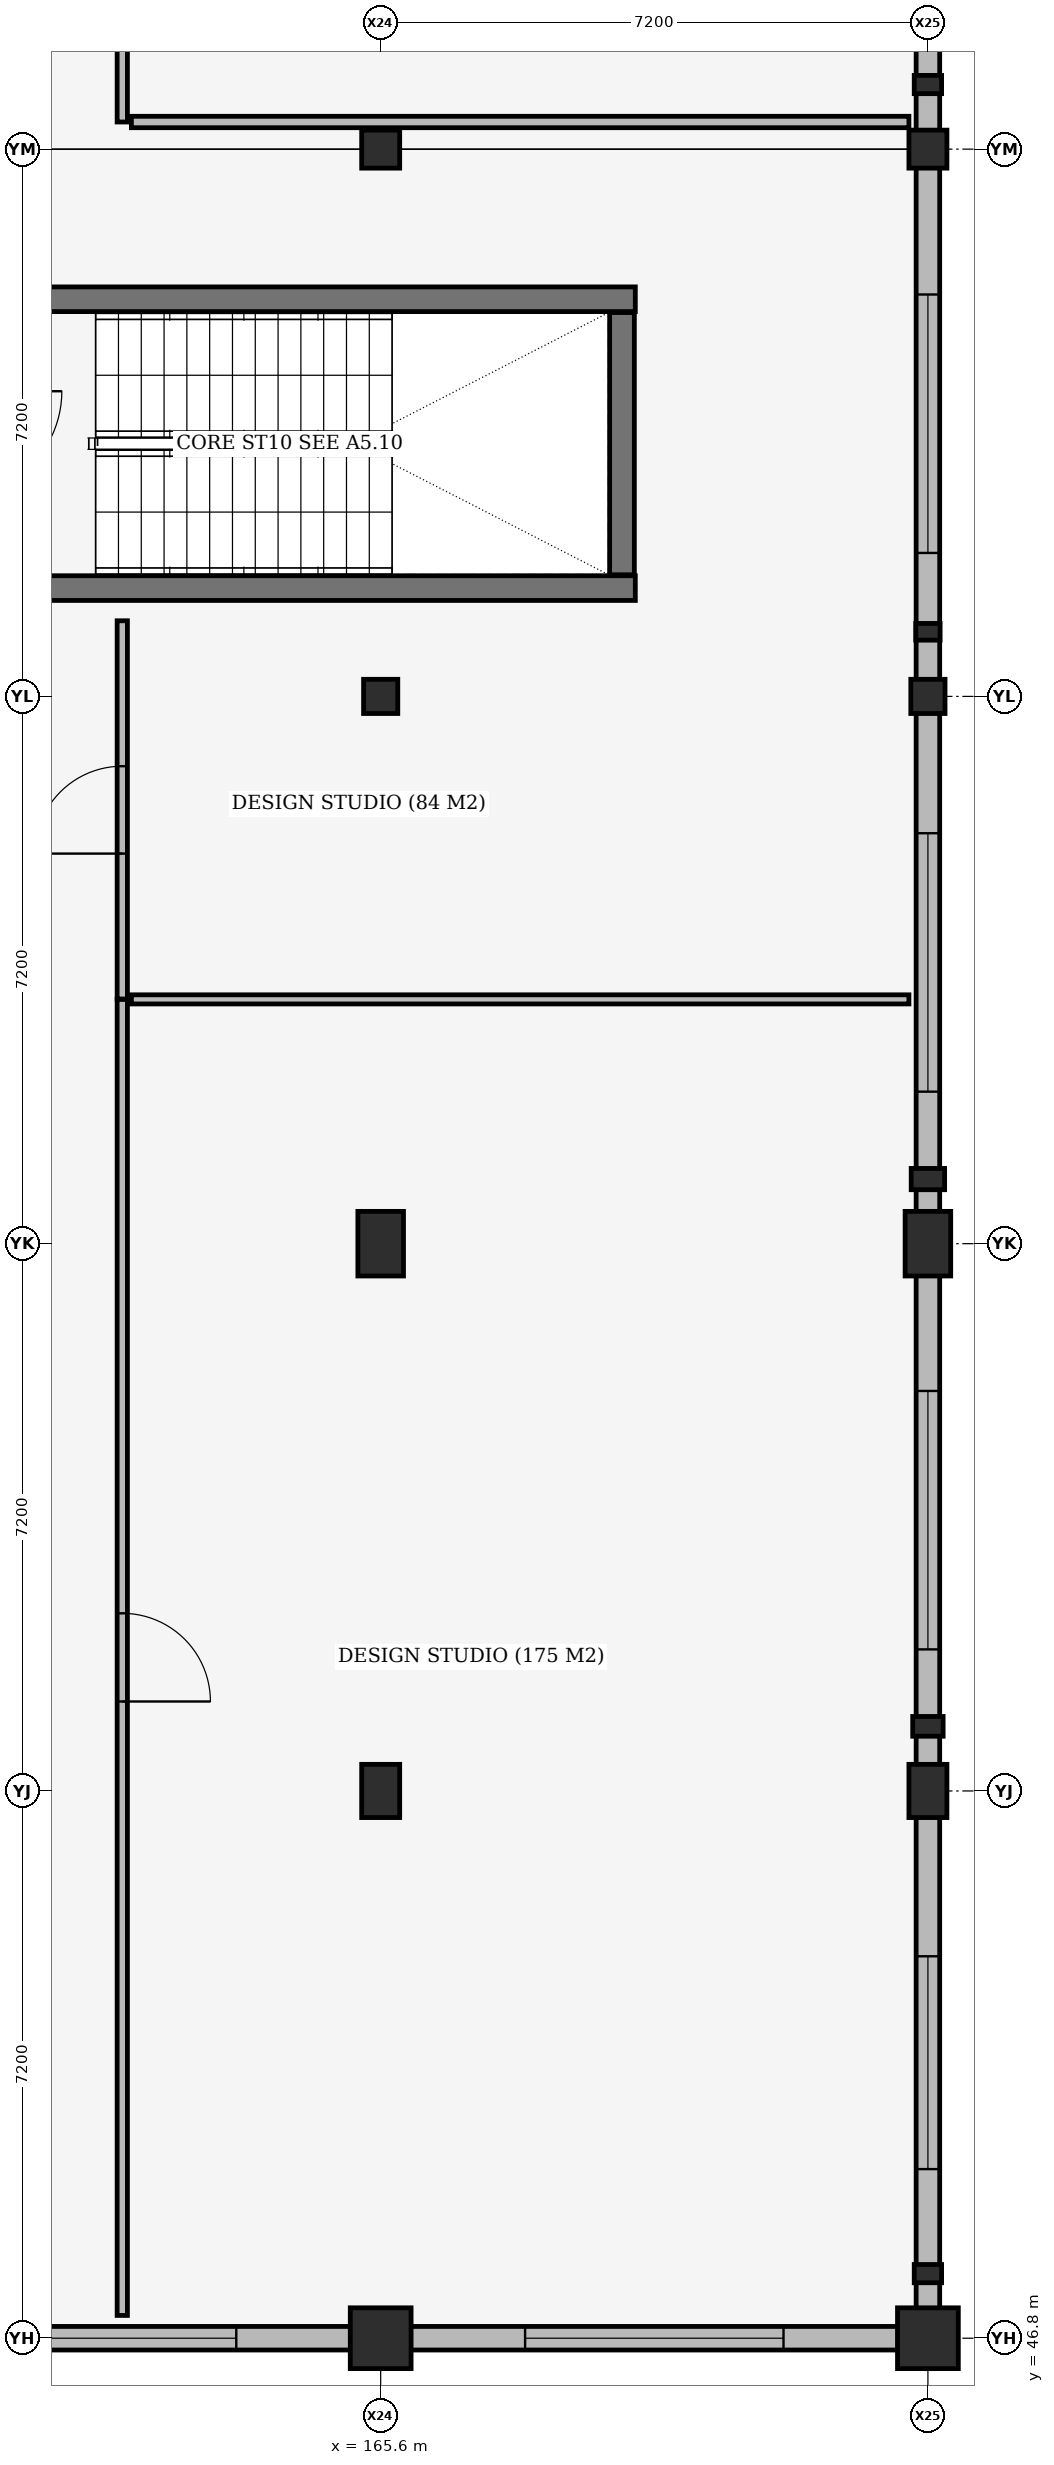
"""IFC4 building model, lengths in metres.
Left out: names, types, materials, properties, quantities, classifications, styles, units other than length and angle.
Written with IfcOpenShell. Run it as: python <this file> out.ifc"""

import sys

from ifc_helpers import new_model, si_unit, direction, frame, frame_2d, origin, origin_2d, place, context, subcontext, project, spatial, rectangle, extrude, element, fill, save


model = new_model("IFC4")
c1 = context("Model", 3, precision=1e-05, world=origin(), true_north=direction((0.0, 1.0)))
c2 = subcontext(c1, "Body", "Model", "MODEL_VIEW")
j1 = project(units=[si_unit("LENGTHUNIT", "METRE"), si_unit("PLANEANGLEUNIT", "RADIAN")], contexts=[c1])
p1 = place(None, origin())
s1 = spatial("IfcSite", under=j1, at=p1, CompositionType="ELEMENT")
p2 = place(p1, origin())
s2 = spatial("IfcBuilding", under=s1, at=p2, CompositionType="ELEMENT")
p3 = place(p2, frame((0.0, 0.0, 5.4)))
s3 = spatial("IfcBuildingStorey", under=s2, at=p3, CompositionType="ELEMENT", Elevation=5.4)
p4 = place(p3, frame((165.6, 46.8, 0.0), z_axis=(0.0, 0.0, 1.0), x_axis=(1.0, 0.0, 0.0)))
e1 = element("IfcColumn", 1, at=p4, inside=s3, PredefinedType="COLUMN", context=c2, shape_type="SweptSolid", body=[
    extrude(rectangle(XDim=0.8, YDim=0.8, at=origin_2d()), origin(), (0.0, 0.0, 1.0), 3.92),
])
p5 = place(p3, frame((165.6, 54.0, 0.0), z_axis=(0.0, 0.0, 1.0), x_axis=(1.0, 0.0, 0.0)))
e2 = element("IfcColumn", 2, at=p5, inside=s3, PredefinedType="COLUMN", context=c2, shape_type="SweptSolid", body=[
    extrude(rectangle(XDim=0.5, YDim=0.7, at=origin_2d()), origin(), (0.0, 0.0, 1.0), 3.92),
])
p6 = place(p3, frame((165.6, 61.2, 0.0), z_axis=(0.0, 0.0, 1.0), x_axis=(1.0, 0.0, 0.0)))
e3 = element("IfcColumn", 3, at=p6, inside=s3, PredefinedType="COLUMN", context=c2, shape_type="SweptSolid", body=[
    extrude(rectangle(XDim=0.6, YDim=0.85, at=origin_2d()), origin(), (0.0, 0.0, 1.0), 3.92),
])
p7 = place(p3, frame((165.6, 68.4, 0.0), z_axis=(0.0, 0.0, 1.0), x_axis=(1.0, 0.0, 0.0)))
e4 = element("IfcColumn", 4, at=p7, inside=s3, PredefinedType="COLUMN", context=c2, shape_type="SweptSolid", body=[
    extrude(rectangle(XDim=0.45, YDim=0.45, at=origin_2d()), origin(), (0.0, 0.0, 1.0), 3.92),
])
p8 = place(p3, frame((165.6, 75.6, 0.0), z_axis=(0.0, 0.0, 1.0), x_axis=(1.0, 0.0, 0.0)))
e5 = element("IfcColumn", 5, at=p8, inside=s3, PredefinedType="COLUMN", context=c2, shape_type="SweptSolid", body=[
    extrude(rectangle(XDim=0.5, YDim=0.5, at=origin_2d()), origin(), (0.0, 0.0, 1.0), 3.92),
])
p9 = place(p3, frame((172.8, 46.8, 0.0), z_axis=(0.0, 0.0, 1.0), x_axis=(1.0, 0.0, 0.0)))
e6 = element("IfcColumn", 6, at=p9, inside=s3, PredefinedType="COLUMN", context=c2, shape_type="SweptSolid", body=[
    extrude(rectangle(XDim=0.8, YDim=0.8, at=origin_2d()), origin(), (0.0, 0.0, 1.0), 3.92),
])
p10 = place(p3, frame((172.8, 54.0, 0.0), z_axis=(0.0, 0.0, 1.0), x_axis=(1.0, 0.0, 0.0)))
e7 = element("IfcColumn", 7, at=p10, inside=s3, PredefinedType="COLUMN", context=c2, shape_type="SweptSolid", body=[
    extrude(rectangle(XDim=0.5, YDim=0.7, at=origin_2d()), origin(), (0.0, 0.0, 1.0), 3.92),
])
p11 = place(p3, frame((172.8, 61.2, 0.0), z_axis=(0.0, 0.0, 1.0), x_axis=(1.0, 0.0, 0.0)))
e8 = element("IfcColumn", 8, at=p11, inside=s3, PredefinedType="COLUMN", context=c2, shape_type="SweptSolid", body=[
    extrude(rectangle(XDim=0.6, YDim=0.85, at=origin_2d()), origin(), (0.0, 0.0, 1.0), 3.92),
])
p12 = place(p3, frame((172.8, 68.4, 0.0), z_axis=(0.0, 0.0, 1.0), x_axis=(1.0, 0.0, 0.0)))
e9 = element("IfcColumn", 9, at=p12, inside=s3, PredefinedType="COLUMN", context=c2, shape_type="SweptSolid", body=[
    extrude(rectangle(XDim=0.45, YDim=0.45, at=origin_2d()), origin(), (0.0, 0.0, 1.0), 3.92),
])
p13 = place(p3, frame((172.8, 75.6, 0.0), z_axis=(0.0, 0.0, 1.0), x_axis=(1.0, 0.0, 0.0)))
e10 = element("IfcColumn", 10, at=p13, inside=s3, PredefinedType="COLUMN", context=c2, shape_type="SweptSolid", body=[
    extrude(rectangle(XDim=0.5, YDim=0.5, at=origin_2d()), origin(), (0.0, 0.0, 1.0), 3.92),
])
p14 = place(p3, frame((172.8, 47.65, 0.0), z_axis=(0.0, 0.0, 1.0), x_axis=(1.0, 0.0, 0.0)))
e11 = element("IfcColumn", 11, at=p14, inside=s3, PredefinedType="PILASTER", context=c2, shape_type="SweptSolid", body=[
    extrude(rectangle(XDim=0.36, YDim=0.24, at=origin_2d()), origin(), (0.0, 0.0, 1.0), 3.92),
])
p15 = place(p3, frame((172.8, 54.85, 0.0), z_axis=(0.0, 0.0, 1.0), x_axis=(1.0, 0.0, 0.0)))
e12 = element("IfcColumn", 12, at=p15, inside=s3, PredefinedType="PILASTER", context=c2, shape_type="SweptSolid", body=[
    extrude(rectangle(XDim=0.4, YDim=0.26, at=origin_2d()), origin(), (0.0, 0.0, 1.0), 3.92),
])
p16 = place(p3, frame((172.8, 62.05, 0.0), z_axis=(0.0, 0.0, 1.0), x_axis=(1.0, 0.0, 0.0)))
e13 = element("IfcColumn", 13, at=p16, inside=s3, PredefinedType="PILASTER", context=c2, shape_type="SweptSolid", body=[
    extrude(rectangle(XDim=0.44, YDim=0.28, at=origin_2d()), origin(), (0.0, 0.0, 1.0), 3.92),
])
p17 = place(p3, frame((172.8, 69.25, 0.0), z_axis=(0.0, 0.0, 1.0), x_axis=(1.0, 0.0, 0.0)))
e14 = element("IfcColumn", 14, at=p17, inside=s3, PredefinedType="PILASTER", context=c2, shape_type="SweptSolid", body=[
    extrude(rectangle(XDim=0.32, YDim=0.22, at=origin_2d()), origin(), (0.0, 0.0, 1.0), 3.92),
])
p18 = place(p3, frame((172.8, 76.45, 0.0), z_axis=(0.0, 0.0, 1.0), x_axis=(1.0, 0.0, 0.0)))
e15 = element("IfcColumn", 15, at=p18, inside=s3, PredefinedType="PILASTER", context=c2, shape_type="SweptSolid", body=[
    extrude(rectangle(XDim=0.36, YDim=0.24, at=origin_2d()), origin(), (0.0, 0.0, 1.0), 3.92),
])
for number, where, z_axis, x_axis in (
    (16, (159.85, 69.825, 0.0), (0.0, 0.0, 1.0), (1.0, 0.0, 0.0)),
    (17, (168.95, 73.625, 0.0), (0.0, 0.0, 1.0), (-1.0, 0.0, 0.0)),
):
    element("IfcWall", number, at=place(p3, frame(where, z_axis=z_axis, x_axis=x_axis)), inside=s3, PredefinedType="SHEAR", context=c2, shape_type="SweptSolid", body=[
        extrude(rectangle(XDim=9.1, YDim=0.325, at=frame_2d((4.55, 0.0))), origin(), (0.0, 0.0, 1.0), 3.92),
    ])
p19 = place(p3, frame((168.775, 70.0, 0.0), z_axis=(0.0, 0.0, 1.0), x_axis=(0.0, 1.0, 0.0)))
e18 = element("IfcWall", 18, at=p19, inside=s3, PredefinedType="SHEAR", context=c2, shape_type="SweptSolid", body=[
    extrude(rectangle(XDim=3.45, YDim=0.325, at=frame_2d((1.725, 0.0))), origin(), (0.0, 0.0, 1.0), 3.92),
])
p20 = place(p3, frame((165.208, 46.8, 0.0), z_axis=(0.0, 0.0, 1.0), x_axis=(-1.0, 0.0, 0.0)))
e19 = element("IfcWall", 19, at=p20, inside=s3, PredefinedType="STANDARD", context=c2, shape_type="SweptSolid", body=[
    extrude(rectangle(XDim=6.416, YDim=0.31, at=frame_2d((3.208, 0.0))), origin(), (0.0, 0.0, 1.0), 3.34),
])
p21 = place(p20, frame((1.508, 0.0, 0.9)))
e20 = element("IfcOpeningElement", 20, at=p21, cuts=e19, PredefinedType="OPENING", context=c2, shape_type="SweptSolid", body=[
    extrude(rectangle(XDim=3.4, YDim=1.5, at=frame_2d((1.7, 0.75))), frame((0.0, 0.165, 0.0), z_axis=(0.0, -1.0, 0.0), x_axis=(1.0, 0.0, 0.0)), (0.0, 0.0, 1.0), 0.33),
])
p22 = place(p3, frame((172.408, 46.8, 0.0), z_axis=(0.0, 0.0, 1.0), x_axis=(-1.0, 0.0, 0.0)))
e21 = element("IfcWall", 21, at=p22, inside=s3, PredefinedType="STANDARD", context=c2, shape_type="SweptSolid", body=[
    extrude(rectangle(XDim=6.416, YDim=0.31, at=frame_2d((3.208, 0.0))), origin(), (0.0, 0.0, 1.0), 3.28),
])
p23 = place(p22, frame((1.508, 0.0, 0.9)))
e22 = element("IfcOpeningElement", 22, at=p23, cuts=e21, PredefinedType="OPENING", context=c2, shape_type="SweptSolid", body=[
    extrude(rectangle(XDim=3.4, YDim=1.5, at=frame_2d((1.7, 0.75))), frame((0.0, 0.165, 0.0), z_axis=(0.0, -1.0, 0.0), x_axis=(1.0, 0.0, 0.0)), (0.0, 0.0, 1.0), 0.33),
])
p24 = place(p3, frame((172.8, 53.658, 0.0), z_axis=(0.0, 0.0, 1.0), x_axis=(0.0, -1.0, 0.0)))
e23 = element("IfcWall", 23, at=p24, inside=s3, PredefinedType="STANDARD", context=c2, shape_type="SweptSolid", body=[
    extrude(rectangle(XDim=6.466, YDim=0.31, at=frame_2d((3.233, 0.0))), origin(), (0.0, 0.0, 1.0), 3.4),
])
p25 = place(p24, frame((1.833, 0.0, 0.85)))
e24 = element("IfcOpeningElement", 24, at=p25, cuts=e23, PredefinedType="OPENING", context=c2, shape_type="SweptSolid", body=[
    extrude(rectangle(XDim=2.8, YDim=2.4, at=frame_2d((1.4, 1.2))), frame((0.0, 0.165, 0.0), z_axis=(0.0, -1.0, 0.0), x_axis=(1.0, 0.0, 0.0)), (0.0, 0.0, 1.0), 0.33),
])
p26 = place(p3, frame((172.8, 60.783, 0.0), z_axis=(0.0, 0.0, 1.0), x_axis=(0.0, -1.0, 0.0)))
e25 = element("IfcWall", 25, at=p26, inside=s3, PredefinedType="STANDARD", context=c2, shape_type="SweptSolid", body=[
    extrude(rectangle(XDim=6.441, YDim=0.31, at=frame_2d((3.22, 0.0))), origin(), (0.0, 0.0, 1.0), 3.34),
])
p27 = place(p26, frame((1.521, 0.0, 0.9)))
e26 = element("IfcOpeningElement", 26, at=p27, cuts=e25, PredefinedType="OPENING", context=c2, shape_type="SweptSolid", body=[
    extrude(rectangle(XDim=3.4, YDim=1.5, at=frame_2d((1.7, 0.75))), frame((0.0, 0.165, 0.0), z_axis=(0.0, -1.0, 0.0), x_axis=(1.0, 0.0, 0.0)), (0.0, 0.0, 1.0), 0.33),
])
p28 = place(p3, frame((172.8, 68.183, 0.0), z_axis=(0.0, 0.0, 1.0), x_axis=(0.0, -1.0, 0.0)))
e27 = element("IfcWall", 27, at=p28, inside=s3, PredefinedType="STANDARD", context=c2, shape_type="SweptSolid", body=[
    extrude(rectangle(XDim=6.566, YDim=0.31, at=frame_2d((3.283, 0.0))), origin(), (0.0, 0.0, 1.0), 3.28),
])
p29 = place(p28, frame((1.583, 0.0, 0.9)))
e28 = element("IfcOpeningElement", 28, at=p29, cuts=e27, PredefinedType="OPENING", context=c2, shape_type="SweptSolid", body=[
    extrude(rectangle(XDim=3.4, YDim=1.5, at=frame_2d((1.7, 0.75))), frame((0.0, 0.165, 0.0), z_axis=(0.0, -1.0, 0.0), x_axis=(1.0, 0.0, 0.0)), (0.0, 0.0, 1.0), 0.33),
])
p30 = place(p3, frame((172.8, 75.358, 0.0), z_axis=(0.0, 0.0, 1.0), x_axis=(0.0, -1.0, 0.0)))
e29 = element("IfcWall", 29, at=p30, inside=s3, PredefinedType="STANDARD", context=c2, shape_type="SweptSolid", body=[
    extrude(rectangle(XDim=6.741, YDim=0.31, at=frame_2d((3.371, 0.0))), origin(), (0.0, 0.0, 1.0), 3.24),
])
p31 = place(p30, frame((1.67, 0.0, 0.9)))
e30 = element("IfcOpeningElement", 30, at=p31, cuts=e29, PredefinedType="OPENING", context=c2, shape_type="SweptSolid", body=[
    extrude(rectangle(XDim=3.4, YDim=1.5, at=frame_2d((1.7, 0.75))), frame((0.0, 0.165, 0.0), z_axis=(0.0, -1.0, 0.0), x_axis=(1.0, 0.0, 0.0)), (0.0, 0.0, 1.0), 0.33),
])
p32 = place(p3, frame((172.8, 82.533, 0.0), z_axis=(0.0, 0.0, 1.0), x_axis=(0.0, -1.0, 0.0)))
e31 = element("IfcWall", 31, at=p32, inside=s3, PredefinedType="STANDARD", context=c2, shape_type="SweptSolid", body=[
    extrude(rectangle(XDim=6.691, YDim=0.31, at=frame_2d((3.345, 0.0))), origin(), (0.0, 0.0, 1.0), 3.18),
])
p33 = place(p32, frame((1.646, 0.0, 0.9)))
e32 = element("IfcOpeningElement", 32, at=p33, cuts=e31, PredefinedType="OPENING", context=c2, shape_type="SweptSolid", body=[
    extrude(rectangle(XDim=3.4, YDim=1.5, at=frame_2d((1.7, 0.75))), frame((0.0, 0.165, 0.0), z_axis=(0.0, -1.0, 0.0), x_axis=(1.0, 0.0, 0.0)), (0.0, 0.0, 1.0), 0.33),
])
p34 = place(p3, frame((162.2, 47.1, 0.0), z_axis=(0.0, 0.0, 1.0), x_axis=(0.0, 1.0, 0.0)))
e33 = element("IfcWall", 33, at=p34, inside=s3, PredefinedType="PARTITIONING", context=c2, shape_type="SweptSolid", body=[
    extrude(rectangle(XDim=17.314, YDim=0.135, at=frame_2d((8.657, 0.0))), origin(), (0.0, 0.0, 1.0), 3.24),
])
p35 = place(p34, frame((8.077, 0.0, 0.0)))
e34 = element("IfcOpeningElement", 34, at=p35, cuts=e33, PredefinedType="OPENING", context=c2, shape_type="SweptSolid", body=[
    extrude(rectangle(XDim=1.16, YDim=2.2, at=frame_2d((0.58, 1.1))), frame((0.0, 0.077, 0.0), z_axis=(0.0, -1.0, 0.0), x_axis=(1.0, 0.0, 0.0)), (0.0, 0.0, 1.0), 0.155),
])
p36 = place(p3, frame((162.32, 64.414, 0.0), z_axis=(0.0, 0.0, 1.0), x_axis=(1.0, 0.0, 0.0)))
e35 = element("IfcWall", 35, at=p36, inside=s3, PredefinedType="PARTITIONING", context=c2, shape_type="SweptSolid", body=[
    extrude(rectangle(XDim=10.23, YDim=0.12, at=frame_2d((5.115, 0.0))), origin(), (0.0, 0.0, 1.0), 3.18),
])
p37 = place(p3, frame((162.2, 64.419, 0.0), z_axis=(0.0, 0.0, 1.0), x_axis=(0.0, 1.0, 0.0)))
e36 = element("IfcWall", 36, at=p37, inside=s3, PredefinedType="PARTITIONING", context=c2, shape_type="SweptSolid", body=[
    extrude(rectangle(XDim=4.976, YDim=0.135, at=frame_2d((2.488, 0.0))), origin(), (0.0, 0.0, 1.0), 3.18),
])
p38 = place(p37, frame((1.913, 0.0, 0.0)))
e37 = element("IfcOpeningElement", 37, at=p38, cuts=e36, PredefinedType="OPENING", context=c2, shape_type="SweptSolid", body=[
    extrude(rectangle(XDim=1.15, YDim=2.2, at=frame_2d((0.575, 1.1))), frame((0.0, 0.077, 0.0), z_axis=(0.0, -1.0, 0.0), x_axis=(1.0, 0.0, 0.0)), (0.0, 0.0, 1.0), 0.155),
])
p39 = place(p3, frame((162.32, 75.957, 0.0), z_axis=(0.0, 0.0, 1.0), x_axis=(1.0, 0.0, 0.0)))
e38 = element("IfcWall", 38, at=p39, inside=s3, PredefinedType="PARTITIONING", context=c2, shape_type="SweptSolid", body=[
    extrude(rectangle(XDim=10.23, YDim=0.15, at=frame_2d((5.115, 0.0))), origin(), (0.0, 0.0, 1.0), 3.4),
])
p40 = place(p3, frame((162.2, 75.957, 0.0), z_axis=(0.0, 0.0, 1.0), x_axis=(0.0, 1.0, 0.0)))
e39 = element("IfcWall", 39, at=p40, inside=s3, PredefinedType="PARTITIONING", context=c2, shape_type="SweptSolid", body=[
    extrude(rectangle(XDim=10.438, YDim=0.135, at=frame_2d((5.219, 0.0))), origin(), (0.0, 0.0, 1.0), 3.18),
])
p41 = place(p40, frame((4.639, 0.0, 0.0)))
e40 = element("IfcOpeningElement", 40, at=p41, cuts=e39, PredefinedType="OPENING", context=c2, shape_type="SweptSolid", body=[
    extrude(rectangle(XDim=1.16, YDim=2.2, at=frame_2d((0.58, 1.1))), frame((0.0, 0.077, 0.0), z_axis=(0.0, -1.0, 0.0), x_axis=(1.0, 0.0, 0.0)), (0.0, 0.0, 1.0), 0.155),
])
p42 = place(p21, origin())
e41 = element("IfcWindow", 41, at=p42, inside=s3, PartitioningType="DOUBLE_PANEL_VERTICAL", PredefinedType="WINDOW", context=c2, shape_type="SweptSolid", body=[
    extrude(rectangle(XDim=3.4, YDim=1.5, at=frame_2d((1.7, 0.75))), frame((0.0, 0.03, 0.0), z_axis=(0.0, -1.0, 0.0), x_axis=(1.0, 0.0, 0.0)), (0.0, 0.0, 1.0), 0.06),
])
fill(e20, e41)
p43 = place(p23, origin())
e42 = element("IfcWindow", 42, at=p43, inside=s3, PartitioningType="DOUBLE_PANEL_VERTICAL", PredefinedType="WINDOW", context=c2, shape_type="SweptSolid", body=[
    extrude(rectangle(XDim=3.4, YDim=1.5, at=frame_2d((1.7, 0.75))), frame((0.0, 0.03, 0.0), z_axis=(0.0, -1.0, 0.0), x_axis=(1.0, 0.0, 0.0)), (0.0, 0.0, 1.0), 0.06),
])
fill(e22, e42)
p44 = place(p25, origin())
e43 = element("IfcWindow", 43, at=p44, inside=s3, PartitioningType="DOUBLE_PANEL_VERTICAL", PredefinedType="WINDOW", context=c2, shape_type="SweptSolid", body=[
    extrude(rectangle(XDim=2.8, YDim=2.4, at=frame_2d((1.4, 1.2))), frame((0.0, 0.03, 0.0), z_axis=(0.0, -1.0, 0.0), x_axis=(1.0, 0.0, 0.0)), (0.0, 0.0, 1.0), 0.06),
])
fill(e24, e43)
p45 = place(p27, origin())
e44 = element("IfcWindow", 44, at=p45, inside=s3, PartitioningType="DOUBLE_PANEL_VERTICAL", PredefinedType="WINDOW", context=c2, shape_type="SweptSolid", body=[
    extrude(rectangle(XDim=3.4, YDim=1.5, at=frame_2d((1.7, 0.75))), frame((0.0, 0.03, 0.0), z_axis=(0.0, -1.0, 0.0), x_axis=(1.0, 0.0, 0.0)), (0.0, 0.0, 1.0), 0.06),
])
fill(e26, e44)
p46 = place(p29, origin())
e45 = element("IfcWindow", 45, at=p46, inside=s3, PartitioningType="DOUBLE_PANEL_VERTICAL", PredefinedType="WINDOW", context=c2, shape_type="SweptSolid", body=[
    extrude(rectangle(XDim=3.4, YDim=1.5, at=frame_2d((1.7, 0.75))), frame((0.0, 0.03, 0.0), z_axis=(0.0, -1.0, 0.0), x_axis=(1.0, 0.0, 0.0)), (0.0, 0.0, 1.0), 0.06),
])
fill(e28, e45)
p47 = place(p31, origin())
e46 = element("IfcWindow", 46, at=p47, inside=s3, PartitioningType="DOUBLE_PANEL_VERTICAL", PredefinedType="WINDOW", context=c2, shape_type="SweptSolid", body=[
    extrude(rectangle(XDim=3.4, YDim=1.5, at=frame_2d((1.7, 0.75))), frame((0.0, 0.03, 0.0), z_axis=(0.0, -1.0, 0.0), x_axis=(1.0, 0.0, 0.0)), (0.0, 0.0, 1.0), 0.06),
])
fill(e30, e46)
p48 = place(p35, origin())
e47 = element("IfcDoor", 47, at=p48, inside=s3, OperationType="SINGLE_SWING_RIGHT", PredefinedType="DOOR", context=c2, shape_type="SweptSolid", body=[
    extrude(rectangle(XDim=1.16, YDim=2.2, at=frame_2d((0.58, 1.1))), frame((0.0, 0.025, 0.0), z_axis=(0.0, -1.0, 0.0), x_axis=(1.0, 0.0, 0.0)), (0.0, 0.0, 1.0), 0.05),
])
fill(e34, e47)
p49 = place(p38, origin())
e48 = element("IfcDoor", 48, at=p49, inside=s3, OperationType="SINGLE_SWING_LEFT", PredefinedType="DOOR", context=c2, shape_type="SweptSolid", body=[
    extrude(rectangle(XDim=1.15, YDim=2.2, at=frame_2d((0.575, 1.1))), frame((0.0, 0.025, 0.0), z_axis=(0.0, -1.0, 0.0), x_axis=(1.0, 0.0, 0.0)), (0.0, 0.0, 1.0), 0.05),
])
fill(e37, e48)
save(model, sys.argv[1])
